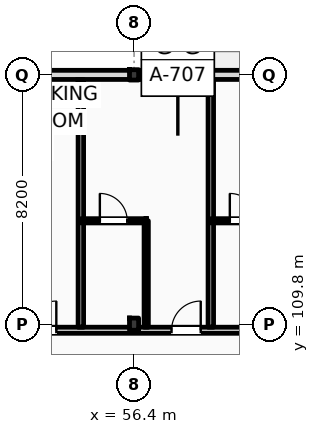
"""IFC4 building model, lengths in metres.
Left out: names, types, materials, properties, quantities, classifications, styles, units other than length and angle.
Written with IfcOpenShell. Run it as: python <this file> out.ifc"""

import sys

from ifc_helpers import new_model, si_unit, direction, frame, frame_2d, origin, origin_2d, place, context, subcontext, project, spatial, rectangle, i_section, extrude, element, fill, save


model = new_model("IFC4")
c1 = context("Model", 3, precision=1e-05, world=origin(), true_north=direction((0.0, 1.0)))
c2 = subcontext(c1, "Body", "Model", "MODEL_VIEW")
j1 = project(units=[si_unit("LENGTHUNIT", "METRE"), si_unit("PLANEANGLEUNIT", "RADIAN")], contexts=[c1])
p1 = place(None, origin())
s1 = spatial("IfcSite", under=j1, at=p1, CompositionType="ELEMENT")
p2 = place(p1, origin())
s2 = spatial("IfcBuilding", under=s1, at=p2, CompositionType="ELEMENT")
p3 = place(p2, frame((0.0, 0.0, 39.0)))
s3 = spatial("IfcBuildingStorey", under=s2, at=p3, CompositionType="ELEMENT", Elevation=39.0)
p4 = place(p3, frame((56.4, 109.8, 0.0), z_axis=(0.0, 0.0, 1.0), x_axis=(1.0, 0.0, 0.0)))
e1 = element("IfcColumn", 1, at=p4, inside=s3, PredefinedType="COLUMN", context=c2, shape_type="SweptSolid", body=[
    extrude(i_section(OverallWidth=0.3, OverallDepth=0.4, WebThickness=0.013, FlangeThickness=0.024, FilletRadius=0.027, at=origin_2d()), origin(), (0.0, 0.0, 1.0), 3.6),
])
p5 = place(p3, frame((56.4, 118.0, 0.0), z_axis=(0.0, 0.0, 1.0), x_axis=(1.0, 0.0, 0.0)))
e2 = element("IfcColumn", 2, at=p5, inside=s3, PredefinedType="COLUMN", context=c2, shape_type="SweptSolid", body=[
    extrude(i_section(OverallWidth=0.3, OverallDepth=0.34, WebThickness=0.012, FlangeThickness=0.021, FilletRadius=0.027, at=origin_2d()), origin(), (0.0, 0.0, 1.0), 3.6),
])
p6 = place(p3, frame((22.5, 118.0, 0.0), z_axis=(0.0, 0.0, 1.0), x_axis=(1.0, 0.0, 0.0)))
e3 = element("IfcWall", 3, at=p6, inside=s3, PredefinedType="STANDARD", context=c2, shape_type="SweptSolid", body=[
    extrude(rectangle(XDim=72.9, YDim=0.3, at=frame_2d((36.45, 0.0))), origin(), (0.0, 0.0, 1.0), 2.92),
])
p7 = place(p6, frame((3.6, 0.0, 0.9)))
e4 = element("IfcOpeningElement", 4, at=p7, cuts=e3, PredefinedType="OPENING", context=c2, shape_type="SweptSolid", body=[
    extrude(rectangle(XDim=1.1, YDim=1.6, at=frame_2d((0.55, 0.8))), frame((0.0, 0.16, 0.0), z_axis=(0.0, -1.0, 0.0), x_axis=(1.0, 0.0, 0.0)), (0.0, 0.0, 1.0), 0.32),
])
p8 = place(p6, frame((6.688, 0.0, 0.0)))
e5 = element("IfcOpeningElement", 5, at=p8, cuts=e3, PredefinedType="OPENING", context=c2, shape_type="SweptSolid", body=[
    extrude(rectangle(XDim=1.2, YDim=2.25, at=frame_2d((0.6, 1.125))), frame((0.0, 0.16, 0.0), z_axis=(0.0, -1.0, 0.0), x_axis=(1.0, 0.0, 0.0)), (0.0, 0.0, 1.0), 0.32),
])
p9 = place(p6, frame((11.388, 0.0, 0.9)))
e6 = element("IfcOpeningElement", 6, at=p9, cuts=e3, PredefinedType="OPENING", context=c2, shape_type="SweptSolid", body=[
    extrude(rectangle(XDim=1.6, YDim=1.75, at=frame_2d((0.8, 0.875))), frame((0.0, 0.16, 0.0), z_axis=(0.0, -1.0, 0.0), x_axis=(1.0, 0.0, 0.0)), (0.0, 0.0, 1.0), 0.32),
])
p10 = place(p6, frame((15.413, 0.0, 0.9)))
e7 = element("IfcOpeningElement", 7, at=p10, cuts=e3, PredefinedType="OPENING", context=c2, shape_type="SweptSolid", body=[
    extrude(rectangle(XDim=1.75, YDim=1.84, at=frame_2d((0.875, 0.92))), frame((0.0, 0.16, 0.0), z_axis=(0.0, -1.0, 0.0), x_axis=(1.0, 0.0, 0.0)), (0.0, 0.0, 1.0), 0.32),
])
p11 = place(p6, frame((21.245, 0.0, 0.0)))
e8 = element("IfcOpeningElement", 8, at=p11, cuts=e3, PredefinedType="OPENING", context=c2, shape_type="SweptSolid", body=[
    extrude(rectangle(XDim=1.2, YDim=2.25, at=frame_2d((0.6, 1.125))), frame((0.0, 0.16, 0.0), z_axis=(0.0, -1.0, 0.0), x_axis=(1.0, 0.0, 0.0)), (0.0, 0.0, 1.0), 0.32),
])
p12 = place(p6, frame((23.705, 0.0, 0.0)))
e9 = element("IfcOpeningElement", 9, at=p12, cuts=e3, PredefinedType="OPENING", context=c2, shape_type="SweptSolid", body=[
    extrude(rectangle(XDim=1.2, YDim=2.25, at=frame_2d((0.6, 1.125))), frame((0.0, 0.16, 0.0), z_axis=(0.0, -1.0, 0.0), x_axis=(1.0, 0.0, 0.0)), (0.0, 0.0, 1.0), 0.32),
])
p13 = place(p6, frame((28.488, 0.0, 0.9)))
e10 = element("IfcOpeningElement", 10, at=p13, cuts=e3, PredefinedType="OPENING", context=c2, shape_type="SweptSolid", body=[
    extrude(rectangle(XDim=2.6, YDim=1.84, at=frame_2d((1.3, 0.92))), frame((0.0, 0.16, 0.0), z_axis=(0.0, -1.0, 0.0), x_axis=(1.0, 0.0, 0.0)), (0.0, 0.0, 1.0), 0.32),
])
p14 = place(p6, frame((34.76, 0.0, 0.9)))
e11 = element("IfcOpeningElement", 11, at=p14, cuts=e3, PredefinedType="OPENING", context=c2, shape_type="SweptSolid", body=[
    extrude(rectangle(XDim=1.1, YDim=1.84, at=frame_2d((0.55, 0.92))), frame((0.0, 0.16, 0.0), z_axis=(0.0, -1.0, 0.0), x_axis=(1.0, 0.0, 0.0)), (0.0, 0.0, 1.0), 0.32),
])
p15 = place(p6, frame((38.143, 0.0, 0.0)))
e12 = element("IfcOpeningElement", 12, at=p15, cuts=e3, PredefinedType="OPENING", context=c2, shape_type="SweptSolid", body=[
    extrude(rectangle(XDim=1.2, YDim=2.25, at=frame_2d((0.6, 1.125))), frame((0.0, 0.16, 0.0), z_axis=(0.0, -1.0, 0.0), x_axis=(1.0, 0.0, 0.0)), (0.0, 0.0, 1.0), 0.32),
])
p16 = place(p6, frame((42.687, 0.0, 0.9)))
e13 = element("IfcOpeningElement", 13, at=p16, cuts=e3, PredefinedType="OPENING", context=c2, shape_type="SweptSolid", body=[
    extrude(rectangle(XDim=1.2, YDim=1.8, at=frame_2d((0.6, 0.9))), frame((0.0, 0.16, 0.0), z_axis=(0.0, -1.0, 0.0), x_axis=(1.0, 0.0, 0.0)), (0.0, 0.0, 1.0), 0.32),
])
p17 = place(p6, frame((47.112, 0.0, 0.9)))
e14 = element("IfcOpeningElement", 14, at=p17, cuts=e3, PredefinedType="OPENING", context=c2, shape_type="SweptSolid", body=[
    extrude(rectangle(XDim=1.35, YDim=1.84, at=frame_2d((0.675, 0.92))), frame((0.0, 0.16, 0.0), z_axis=(0.0, -1.0, 0.0), x_axis=(1.0, 0.0, 0.0)), (0.0, 0.0, 1.0), 0.32),
])
p18 = place(p6, frame((52.482, 0.0, 0.0)))
e15 = element("IfcOpeningElement", 15, at=p18, cuts=e3, PredefinedType="OPENING", context=c2, shape_type="SweptSolid", body=[
    extrude(rectangle(XDim=1.2, YDim=2.25, at=frame_2d((0.6, 1.125))), frame((0.0, 0.16, 0.0), z_axis=(0.0, -1.0, 0.0), x_axis=(1.0, 0.0, 0.0)), (0.0, 0.0, 1.0), 0.32),
])
p19 = place(p6, frame((54.942, 0.0, 0.0)))
e16 = element("IfcOpeningElement", 16, at=p19, cuts=e3, PredefinedType="OPENING", context=c2, shape_type="SweptSolid", body=[
    extrude(rectangle(XDim=1.2, YDim=2.25, at=frame_2d((0.6, 1.125))), frame((0.0, 0.16, 0.0), z_axis=(0.0, -1.0, 0.0), x_axis=(1.0, 0.0, 0.0)), (0.0, 0.0, 1.0), 0.32),
])
p20 = place(p6, frame((60.387, 0.0, 0.9)))
e17 = element("IfcOpeningElement", 17, at=p20, cuts=e3, PredefinedType="OPENING", context=c2, shape_type="SweptSolid", body=[
    extrude(rectangle(XDim=1.8, YDim=1.84, at=frame_2d((0.9, 0.92))), frame((0.0, 0.16, 0.0), z_axis=(0.0, -1.0, 0.0), x_axis=(1.0, 0.0, 0.0)), (0.0, 0.0, 1.0), 0.32),
])
p21 = place(p6, frame((66.013, 0.0, 0.9)))
e18 = element("IfcOpeningElement", 18, at=p21, cuts=e3, PredefinedType="OPENING", context=c2, shape_type="SweptSolid", body=[
    extrude(rectangle(XDim=1.35, YDim=1.84, at=frame_2d((0.675, 0.92))), frame((0.0, 0.16, 0.0), z_axis=(0.0, -1.0, 0.0), x_axis=(1.0, 0.0, 0.0)), (0.0, 0.0, 1.0), 0.32),
])
p22 = place(p6, frame((69.275, 0.0, 0.9)))
e19 = element("IfcOpeningElement", 19, at=p22, cuts=e3, PredefinedType="OPENING", context=c2, shape_type="SweptSolid", body=[
    extrude(rectangle(XDim=2.1, YDim=1.84, at=frame_2d((1.05, 0.92))), frame((0.0, 0.16, 0.0), z_axis=(0.0, -1.0, 0.0), x_axis=(1.0, 0.0, 0.0)), (0.0, 0.0, 1.0), 0.32),
])
p23 = place(p3, frame((10.65, 109.6, 0.0), z_axis=(0.0, 0.0, 1.0), x_axis=(1.0, 0.0, 0.0)))
e20 = element("IfcWall", 20, at=p23, inside=s3, PredefinedType="PARTITIONING", context=c2, shape_type="SweptSolid", body=[
    extrude(rectangle(XDim=84.61, YDim=0.2, at=frame_2d((42.305, 0.0))), origin(), (0.0, 0.0, 1.0), 2.82),
])
p24 = place(p23, frame((15.49, 0.0, 0.0)))
e21 = element("IfcOpeningElement", 21, at=p24, cuts=e20, PredefinedType="OPENING", context=c2, shape_type="SweptSolid", body=[
    extrude(rectangle(XDim=1.02, YDim=2.2, at=frame_2d((0.51, 1.1))), frame((0.0, 0.11, 0.0), z_axis=(0.0, -1.0, 0.0), x_axis=(1.0, 0.0, 0.0)), (0.0, 0.0, 1.0), 0.22),
])
p25 = place(p23, frame((19.703, 0.0, 0.0)))
e22 = element("IfcOpeningElement", 22, at=p25, cuts=e20, PredefinedType="OPENING", context=c2, shape_type="SweptSolid", body=[
    extrude(rectangle(XDim=1.02, YDim=2.2, at=frame_2d((0.51, 1.1))), frame((0.0, 0.11, 0.0), z_axis=(0.0, -1.0, 0.0), x_axis=(1.0, 0.0, 0.0)), (0.0, 0.0, 1.0), 0.22),
])
p26 = place(p23, frame((24.203, 0.0, 0.0)))
e23 = element("IfcOpeningElement", 23, at=p26, cuts=e20, PredefinedType="OPENING", context=c2, shape_type="SweptSolid", body=[
    extrude(rectangle(XDim=1.02, YDim=2.2, at=frame_2d((0.51, 1.1))), frame((0.0, 0.11, 0.0), z_axis=(0.0, -1.0, 0.0), x_axis=(1.0, 0.0, 0.0)), (0.0, 0.0, 1.0), 0.22),
])
p27 = place(p23, frame((26.552, 0.0, 0.0)))
e24 = element("IfcOpeningElement", 24, at=p27, cuts=e20, PredefinedType="OPENING", context=c2, shape_type="SweptSolid", body=[
    extrude(rectangle(XDim=1.02, YDim=2.2, at=frame_2d((0.51, 1.1))), frame((0.0, 0.11, 0.0), z_axis=(0.0, -1.0, 0.0), x_axis=(1.0, 0.0, 0.0)), (0.0, 0.0, 1.0), 0.22),
])
p28 = place(p23, frame((33.233, 0.0, 0.0)))
e25 = element("IfcOpeningElement", 25, at=p28, cuts=e20, PredefinedType="OPENING", context=c2, shape_type="SweptSolid", body=[
    extrude(rectangle(XDim=0.96, YDim=2.2, at=frame_2d((0.48, 1.1))), frame((0.0, 0.11, 0.0), z_axis=(0.0, -1.0, 0.0), x_axis=(1.0, 0.0, 0.0)), (0.0, 0.0, 1.0), 0.22),
])
p29 = place(p23, frame((35.583, 0.0, 0.0)))
e26 = element("IfcOpeningElement", 26, at=p29, cuts=e20, PredefinedType="OPENING", context=c2, shape_type="SweptSolid", body=[
    extrude(rectangle(XDim=0.96, YDim=2.2, at=frame_2d((0.48, 1.1))), frame((0.0, 0.11, 0.0), z_axis=(0.0, -1.0, 0.0), x_axis=(1.0, 0.0, 0.0)), (0.0, 0.0, 1.0), 0.22),
])
p30 = place(p23, frame((42.233, 0.0, 0.0)))
e27 = element("IfcOpeningElement", 27, at=p30, cuts=e20, PredefinedType="OPENING", context=c2, shape_type="SweptSolid", body=[
    extrude(rectangle(XDim=0.96, YDim=2.2, at=frame_2d((0.48, 1.1))), frame((0.0, 0.11, 0.0), z_axis=(0.0, -1.0, 0.0), x_axis=(1.0, 0.0, 0.0)), (0.0, 0.0, 1.0), 0.22),
])
p31 = place(p23, frame((46.983, 0.0, 0.0)))
e28 = element("IfcOpeningElement", 28, at=p31, cuts=e20, PredefinedType="OPENING", context=c2, shape_type="SweptSolid", body=[
    extrude(rectangle(XDim=0.96, YDim=2.2, at=frame_2d((0.48, 1.1))), frame((0.0, 0.11, 0.0), z_axis=(0.0, -1.0, 0.0), x_axis=(1.0, 0.0, 0.0)), (0.0, 0.0, 1.0), 0.22),
])
p32 = place(p23, frame((51.233, 0.0, 0.0)))
e29 = element("IfcOpeningElement", 29, at=p32, cuts=e20, PredefinedType="OPENING", context=c2, shape_type="SweptSolid", body=[
    extrude(rectangle(XDim=0.96, YDim=2.2, at=frame_2d((0.48, 1.1))), frame((0.0, 0.11, 0.0), z_axis=(0.0, -1.0, 0.0), x_axis=(1.0, 0.0, 0.0)), (0.0, 0.0, 1.0), 0.22),
])
p33 = place(p23, frame((55.733, 0.0, 0.0)))
e30 = element("IfcOpeningElement", 30, at=p33, cuts=e20, PredefinedType="OPENING", context=c2, shape_type="SweptSolid", body=[
    extrude(rectangle(XDim=0.96, YDim=2.2, at=frame_2d((0.48, 1.1))), frame((0.0, 0.11, 0.0), z_axis=(0.0, -1.0, 0.0), x_axis=(1.0, 0.0, 0.0)), (0.0, 0.0, 1.0), 0.22),
])
p34 = place(p23, frame((58.083, 0.0, 0.0)))
e31 = element("IfcOpeningElement", 31, at=p34, cuts=e20, PredefinedType="OPENING", context=c2, shape_type="SweptSolid", body=[
    extrude(rectangle(XDim=0.96, YDim=2.2, at=frame_2d((0.48, 1.1))), frame((0.0, 0.11, 0.0), z_axis=(0.0, -1.0, 0.0), x_axis=(1.0, 0.0, 0.0)), (0.0, 0.0, 1.0), 0.22),
])
p35 = place(p23, frame((64.732, 0.0, 0.0)))
e32 = element("IfcOpeningElement", 32, at=p35, cuts=e20, PredefinedType="OPENING", context=c2, shape_type="SweptSolid", body=[
    extrude(rectangle(XDim=0.96, YDim=2.2, at=frame_2d((0.48, 1.1))), frame((0.0, 0.11, 0.0), z_axis=(0.0, -1.0, 0.0), x_axis=(1.0, 0.0, 0.0)), (0.0, 0.0, 1.0), 0.22),
])
p36 = place(p23, frame((66.832, 0.0, 0.0)))
e33 = element("IfcOpeningElement", 33, at=p36, cuts=e20, PredefinedType="OPENING", context=c2, shape_type="SweptSolid", body=[
    extrude(rectangle(XDim=0.96, YDim=2.2, at=frame_2d((0.48, 1.1))), frame((0.0, 0.11, 0.0), z_axis=(0.0, -1.0, 0.0), x_axis=(1.0, 0.0, 0.0)), (0.0, 0.0, 1.0), 0.22),
])
p37 = place(p23, frame((73.732, 0.0, 0.0)))
e34 = element("IfcOpeningElement", 34, at=p37, cuts=e20, PredefinedType="OPENING", context=c2, shape_type="SweptSolid", body=[
    extrude(rectangle(XDim=0.96, YDim=2.2, at=frame_2d((0.48, 1.1))), frame((0.0, 0.11, 0.0), z_axis=(0.0, -1.0, 0.0), x_axis=(1.0, 0.0, 0.0)), (0.0, 0.0, 1.0), 0.22),
])
p38 = place(p23, frame((78.233, 0.0, 0.0)))
e35 = element("IfcOpeningElement", 35, at=p38, cuts=e20, PredefinedType="OPENING", context=c2, shape_type="SweptSolid", body=[
    extrude(rectangle(XDim=0.96, YDim=2.2, at=frame_2d((0.48, 1.1))), frame((0.0, 0.11, 0.0), z_axis=(0.0, -1.0, 0.0), x_axis=(1.0, 0.0, 0.0)), (0.0, 0.0, 1.0), 0.22),
])
p39 = place(p23, frame((80.62, 0.0, 0.0)))
e36 = element("IfcOpeningElement", 36, at=p39, cuts=e20, PredefinedType="OPENING", context=c2, shape_type="SweptSolid", body=[
    extrude(rectangle(XDim=0.96, YDim=2.2, at=frame_2d((0.48, 1.1))), frame((0.0, 0.11, 0.0), z_axis=(0.0, -1.0, 0.0), x_axis=(1.0, 0.0, 0.0)), (0.0, 0.0, 1.0), 0.22),
])
p40 = place(p23, frame((2.716, 0.0, 0.0)))
e37 = element("IfcOpeningElement", 37, at=p40, cuts=e20, PredefinedType="OPENING", context=c2, shape_type="SweptSolid", body=[
    extrude(rectangle(XDim=1.35, YDim=2.25, at=frame_2d((0.675, 1.125))), frame((0.0, 0.11, 0.0), z_axis=(0.0, -1.0, 0.0), x_axis=(1.0, 0.0, 0.0)), (0.0, 0.0, 1.0), 0.22),
])
p41 = place(p23, frame((6.65, 0.0, 0.0)))
e38 = element("IfcOpeningElement", 38, at=p41, cuts=e20, PredefinedType="OPENING", context=c2, shape_type="SweptSolid", body=[
    extrude(rectangle(XDim=1.35, YDim=2.25, at=frame_2d((0.675, 1.125))), frame((0.0, 0.11, 0.0), z_axis=(0.0, -1.0, 0.0), x_axis=(1.0, 0.0, 0.0)), (0.0, 0.0, 1.0), 0.22),
])
p42 = place(p23, frame((10.583, 0.0, 0.0)))
e39 = element("IfcOpeningElement", 39, at=p42, cuts=e20, PredefinedType="OPENING", context=c2, shape_type="SweptSolid", body=[
    extrude(rectangle(XDim=1.35, YDim=2.25, at=frame_2d((0.675, 1.125))), frame((0.0, 0.11, 0.0), z_axis=(0.0, -1.0, 0.0), x_axis=(1.0, 0.0, 0.0)), (0.0, 0.0, 1.0), 0.22),
])
p43 = place(p3, frame((54.65, 109.7, 0.0), z_axis=(0.0, 0.0, 1.0), x_axis=(0.0, 1.0, 0.0)))
e40 = element("IfcWall", 40, at=p43, inside=s3, PredefinedType="PARTITIONING", context=c2, shape_type="SweptSolid", body=[
    extrude(rectangle(XDim=8.15, YDim=0.18, at=frame_2d((4.075, 0.0))), origin(), (0.0, 0.0, 1.0), 3.38),
])
p44 = place(p3, frame((58.925, 109.7, 0.0), z_axis=(0.0, 0.0, 1.0), x_axis=(0.0, 1.0, 0.0)))
e41 = element("IfcWall", 41, at=p44, inside=s3, PredefinedType="PARTITIONING", context=c2, shape_type="SweptSolid", body=[
    extrude(rectangle(XDim=8.15, YDim=0.18, at=frame_2d((4.075, 0.0))), origin(), (0.0, 0.0, 1.0), 3.07),
])
p45 = place(p3, frame((56.8, 109.7, 0.0), z_axis=(0.0, 0.0, 1.0), x_axis=(0.0, 1.0, 0.0)))
e42 = element("IfcWall", 42, at=p45, inside=s3, PredefinedType="PARTITIONING", context=c2, shape_type="SweptSolid", body=[
    extrude(rectangle(XDim=3.5, YDim=0.14, at=frame_2d((1.75, 0.0))), origin(), (0.0, 0.0, 1.0), 3.38),
])
p46 = place(p3, frame((54.65, 113.2, 0.0), z_axis=(0.0, 0.0, 1.0), x_axis=(1.0, 0.0, 0.0)))
e43 = element("IfcWall", 43, at=p46, inside=s3, PredefinedType="PARTITIONING", context=c2, shape_type="SweptSolid", body=[
    extrude(rectangle(XDim=2.15, YDim=0.14, at=frame_2d((1.075, 0.0))), origin(), (0.0, 0.0, 1.0), 3.38),
])
p47 = place(p46, frame((0.625, 0.0, 0.0)))
e44 = element("IfcOpeningElement", 44, at=p47, cuts=e43, PredefinedType="OPENING", context=c2, shape_type="SweptSolid", body=[
    extrude(rectangle(XDim=0.9, YDim=2.1, at=frame_2d((0.45, 1.05))), frame((0.0, 0.08, 0.0), z_axis=(0.0, -1.0, 0.0), x_axis=(1.0, 0.0, 0.0)), (0.0, 0.0, 1.0), 0.16),
])
p48 = place(p3, frame((58.925, 113.2, 0.0), z_axis=(0.0, 0.0, 1.0), x_axis=(1.0, 0.0, 0.0)))
e45 = element("IfcWall", 45, at=p48, inside=s3, PredefinedType="PARTITIONING", context=c2, shape_type="SweptSolid", body=[
    extrude(rectangle(XDim=2.15, YDim=0.14, at=frame_2d((1.075, 0.0))), origin(), (0.0, 0.0, 1.0), 3.38),
])
p49 = place(p48, frame((0.625, 0.0, 0.0)))
e46 = element("IfcOpeningElement", 46, at=p49, cuts=e45, PredefinedType="OPENING", context=c2, shape_type="SweptSolid", body=[
    extrude(rectangle(XDim=0.9, YDim=2.1, at=frame_2d((0.45, 1.05))), frame((0.0, 0.08, 0.0), z_axis=(0.0, -1.0, 0.0), x_axis=(1.0, 0.0, 0.0)), (0.0, 0.0, 1.0), 0.16),
])
p50 = place(p14, origin())
e47 = element("IfcWindow", 47, at=p50, inside=s3, PartitioningType="DOUBLE_PANEL_VERTICAL", PredefinedType="WINDOW", context=c2, shape_type="SweptSolid", body=[
    extrude(rectangle(XDim=1.1, YDim=1.84, at=frame_2d((0.55, 0.92))), frame((0.0, 0.03, 0.0), z_axis=(0.0, -1.0, 0.0), x_axis=(1.0, 0.0, 0.0)), (0.0, 0.0, 1.0), 0.06),
])
fill(e11, e47)
p51 = place(p30, origin())
e48 = element("IfcDoor", 48, at=p51, inside=s3, OperationType="SINGLE_SWING_RIGHT", PredefinedType="DOOR", context=c2, shape_type="SweptSolid", body=[
    extrude(rectangle(XDim=0.96, YDim=2.2, at=frame_2d((0.48, 1.1))), frame((0.0, 0.025, 0.0), z_axis=(0.0, -1.0, 0.0), x_axis=(1.0, 0.0, 0.0)), (0.0, 0.0, 1.0), 0.05),
])
fill(e27, e48)
p52 = place(p31, origin())
e49 = element("IfcDoor", 49, at=p52, inside=s3, OperationType="SINGLE_SWING_RIGHT", PredefinedType="DOOR", context=c2, shape_type="SweptSolid", body=[
    extrude(rectangle(XDim=0.96, YDim=2.2, at=frame_2d((0.48, 1.1))), frame((0.0, 0.025, 0.0), z_axis=(0.0, -1.0, 0.0), x_axis=(1.0, 0.0, 0.0)), (0.0, 0.0, 1.0), 0.05),
])
fill(e28, e49)
p53 = place(p47, origin())
e50 = element("IfcDoor", 50, at=p53, inside=s3, OperationType="SINGLE_SWING_LEFT", PredefinedType="DOOR", context=c2, shape_type="SweptSolid", body=[
    extrude(rectangle(XDim=0.9, YDim=2.1, at=frame_2d((0.45, 1.05))), frame((0.0, 0.025, 0.0), z_axis=(0.0, -1.0, 0.0), x_axis=(1.0, 0.0, 0.0)), (0.0, 0.0, 1.0), 0.05),
])
fill(e44, e50)
p54 = place(p49, origin())
e51 = element("IfcDoor", 51, at=p54, inside=s3, OperationType="SINGLE_SWING_LEFT", PredefinedType="DOOR", context=c2, shape_type="SweptSolid", body=[
    extrude(rectangle(XDim=0.9, YDim=2.1, at=frame_2d((0.45, 1.05))), frame((0.0, 0.025, 0.0), z_axis=(0.0, -1.0, 0.0), x_axis=(1.0, 0.0, 0.0)), (0.0, 0.0, 1.0), 0.05),
])
fill(e46, e51)
save(model, sys.argv[1])
